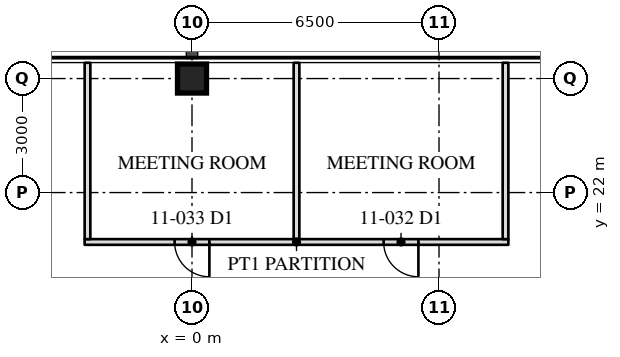
"""IFC4 building model, lengths in metres.
Left out: names, types, materials, properties, quantities, classifications, styles, units other than length and angle.
Written with IfcOpenShell. Run it as: python <this file> out.ifc"""

import sys

from ifc_helpers import new_model, si_unit, direction, frame, frame_2d, origin, origin_2d, place, context, subcontext, project, spatial, rectangle, hollow_rectangle, extrude, element, fill, save


model = new_model("IFC4")
c1 = context("Model", 3, precision=1e-05, world=origin(), true_north=direction((0.0, 1.0)))
c2 = subcontext(c1, "Body", "Model", "MODEL_VIEW")
j1 = project(units=[si_unit("LENGTHUNIT", "METRE"), si_unit("PLANEANGLEUNIT", "RADIAN")], contexts=[c1])
p1 = place(None, origin())
s1 = spatial("IfcSite", under=j1, at=p1, CompositionType="ELEMENT")
p2 = place(p1, origin())
s2 = spatial("IfcBuilding", under=s1, at=p2, CompositionType="ELEMENT")
p3 = place(p2, frame((0.0, 0.0, 48.8)))
s3 = spatial("IfcBuildingStorey", under=s2, at=p3, CompositionType="ELEMENT", Elevation=48.8)
p4 = place(p3, frame((0.0, 25.0, 0.0), z_axis=(0.0, 0.0, 1.0), x_axis=(1.0, 0.0, 0.0)))
e1 = element("IfcColumn", 1, at=p4, inside=s3, PredefinedType="COLUMN", context=c2, shape_type="SweptSolid", body=[
    extrude(hollow_rectangle(XDim=0.762, YDim=0.762, WallThickness=0.127, at=origin_2d()), origin(), (0.0, 0.0, 1.0), 4.1),
])
p5 = place(p3, frame((8.325, 20.7, 0.0), z_axis=(0.0, 0.0, 1.0), x_axis=(-1.0, 0.0, 0.0)))
e2 = element("IfcWall", 2, at=p5, inside=s3, PredefinedType="PARTITIONING", context=c2, shape_type="SweptSolid", body=[
    extrude(rectangle(XDim=11.15, YDim=0.15, at=frame_2d((5.575, 0.0))), origin(), (0.0, 0.0, 1.0), 3.91),
])
p6 = place(p5, frame((2.367, 0.0, 0.0)))
e3 = element("IfcOpeningElement", 3, at=p6, cuts=e2, PredefinedType="OPENING", context=c2, shape_type="SweptSolid", body=[
    extrude(rectangle(XDim=0.915, YDim=2.134, at=frame_2d((0.458, 1.067))), frame((0.0, 0.085, 0.0), z_axis=(0.0, -1.0, 0.0), x_axis=(1.0, 0.0, 0.0)), (0.0, 0.0, 1.0), 0.17),
])
p7 = place(p5, frame((7.867, 0.0, 0.0)))
e4 = element("IfcOpeningElement", 4, at=p7, cuts=e2, PredefinedType="OPENING", context=c2, shape_type="SweptSolid", body=[
    extrude(rectangle(XDim=0.915, YDim=2.134, at=frame_2d((0.458, 1.067))), frame((0.0, 0.085, 0.0), z_axis=(0.0, -1.0, 0.0), x_axis=(1.0, 0.0, 0.0)), (0.0, 0.0, 1.0), 0.17),
])
for number, where, z_axis, x_axis in (
    (5, (8.25, 20.775, 0.0), (0.0, 0.0, 1.0), (0.0, 1.0, 0.0)),
    (6, (2.75, 20.775, 0.0), (0.0, 0.0, 1.0), (0.0, 1.0, 0.0)),
    (7, (-2.75, 20.775, 0.0), (0.0, 0.0, 1.0), (0.0, 1.0, 0.0)),
):
    element("IfcWall", number, at=place(p3, frame(where, z_axis=z_axis, x_axis=x_axis)), inside=s3, PredefinedType="PARTITIONING", context=c2, shape_type="SweptSolid", body=[
        extrude(rectangle(XDim=4.64, YDim=0.15, at=frame_2d((2.32, 0.0))), origin(), (0.0, 0.0, 1.0), 3.91),
    ])
p8 = place(p6, origin())
e8 = element("IfcDoor", 8, at=p8, inside=s3, OperationType="SINGLE_SWING_LEFT", PredefinedType="DOOR", context=c2, shape_type="SweptSolid", body=[
    extrude(rectangle(XDim=0.915, YDim=2.134, at=frame_2d((0.458, 1.067))), frame((0.0, 0.025, 0.0), z_axis=(0.0, -1.0, 0.0), x_axis=(1.0, 0.0, 0.0)), (0.0, 0.0, 1.0), 0.05),
])
fill(e3, e8)
p9 = place(p7, origin())
e9 = element("IfcDoor", 9, at=p9, inside=s3, OperationType="SINGLE_SWING_LEFT", PredefinedType="DOOR", context=c2, shape_type="SweptSolid", body=[
    extrude(rectangle(XDim=0.915, YDim=2.134, at=frame_2d((0.458, 1.067))), frame((0.0, 0.025, 0.0), z_axis=(0.0, -1.0, 0.0), x_axis=(1.0, 0.0, 0.0)), (0.0, 0.0, 1.0), 0.05),
])
fill(e4, e9)
save(model, sys.argv[1])
